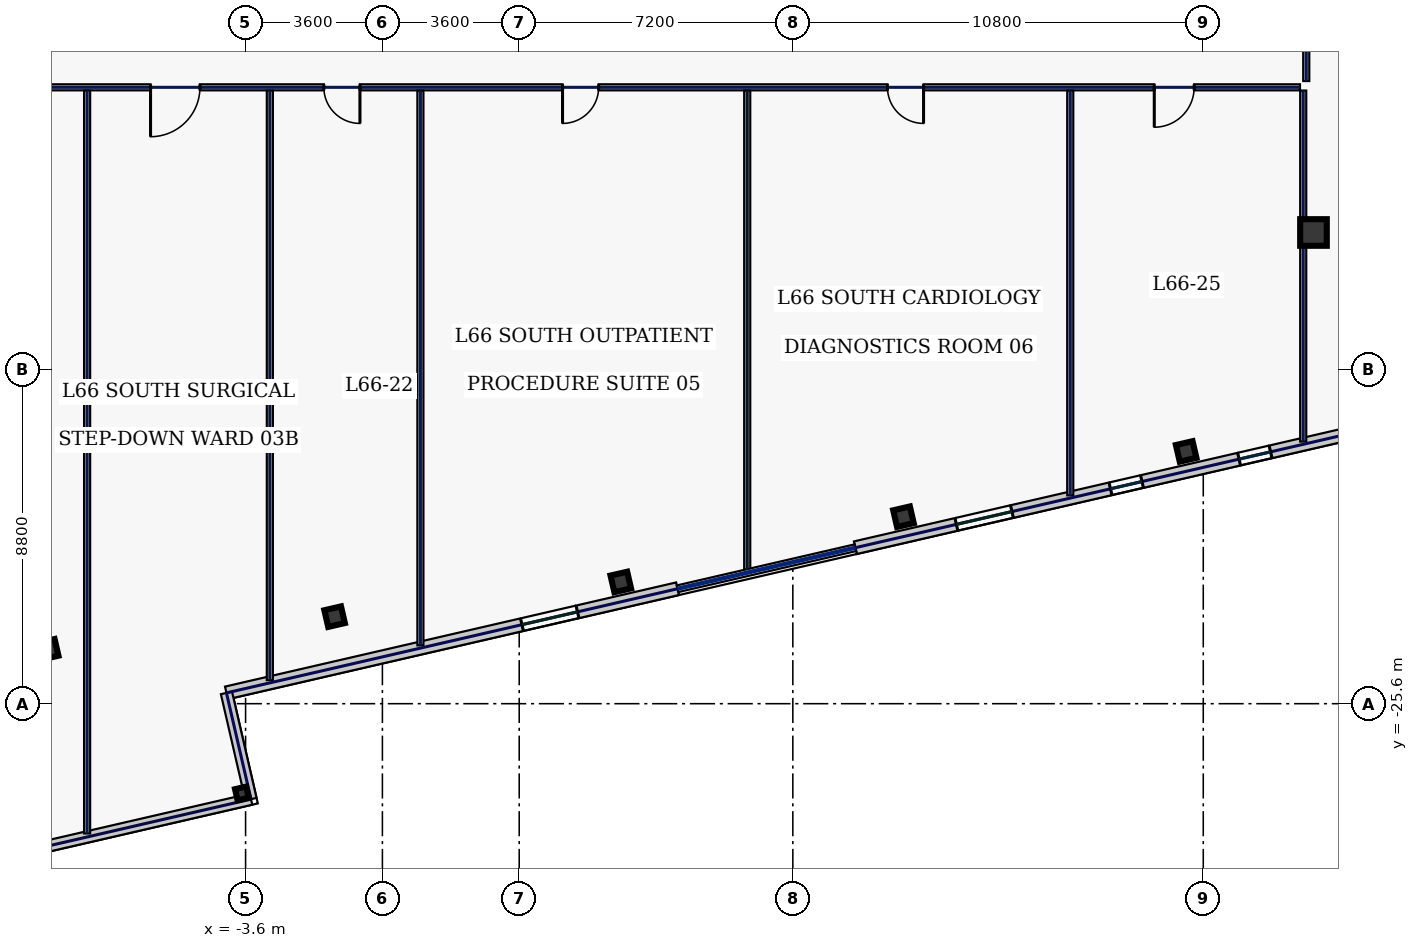
"""IFC4 building model, lengths in metres.
Left out: names, types, materials, properties, quantities, classifications, styles, units other than length and angle.
Written with IfcOpenShell. Run it as: python <this file> out.ifc"""

import sys

from ifc_helpers import new_model, si_unit, direction, frame, frame_2d, origin, origin_2d, place, context, subcontext, project, spatial, rectangle, hollow_rectangle, extrude, element, fill, save


model = new_model("IFC4")
c1 = context("Model", 3, precision=1e-05, world=origin(), true_north=direction((0.0, 1.0)))
c2 = subcontext(c1, "Body", "Model", "MODEL_VIEW")
j1 = project(units=[si_unit("LENGTHUNIT", "METRE"), si_unit("PLANEANGLEUNIT", "RADIAN")], contexts=[c1])
p1 = place(None, origin())
s1 = spatial("IfcSite", under=j1, at=p1, CompositionType="ELEMENT")
p2 = place(p1, origin())
s2 = spatial("IfcBuilding", under=s1, at=p2, CompositionType="ELEMENT")
p3 = place(p2, frame((0.0, 0.0, 285.0)))
s3 = spatial("IfcBuildingStorey", under=s2, at=p3, CompositionType="ELEMENT", Elevation=285.0)
p4 = place(p3, frame((24.5, -13.2, 0.0), z_axis=(0.0, 0.0, 1.0), x_axis=(1.0, 0.0, 0.0)))
e1 = element("IfcColumn", 1, at=p4, inside=s3, PredefinedType="COLUMN", context=c2, shape_type="SweptSolid", body=[
    extrude(hollow_rectangle(XDim=0.7, YDim=0.7, WallThickness=0.032, at=origin_2d()), origin(), (0.0, 0.0, 1.0), 3.74),
])
for number, where, z_axis, x_axis in (
    (2, (-8.794, -24.168, 0.0), (0.0, 0.0, 1.0), (0.974, 0.225, 0.0)),
    (3, (-1.258, -23.31, 0.0), (0.0, 0.0, 1.0), (0.974, 0.225, 0.0)),
    (4, (6.273, -22.397, 0.0), (0.0, 0.0, 1.0), (0.974, 0.225, 0.0)),
    (5, (13.711, -20.68, 0.0), (0.0, 0.0, 1.0), (0.974, 0.225, 0.0)),
    (6, (21.15, -18.962, 0.0), (0.0, 0.0, 1.0), (0.974, 0.225, 0.0)),
):
    element("IfcColumn", number, at=place(p3, frame(where, z_axis=z_axis, x_axis=x_axis)), inside=s3, PredefinedType="COLUMN", context=c2, shape_type="SweptSolid", body=[
        extrude(hollow_rectangle(XDim=0.45, YDim=0.45, WallThickness=0.022, at=origin_2d()), origin(), (0.0, 0.0, 1.0), 3.74),
    ])
p5 = place(p3, frame((-3.698, -27.963, 0.0), z_axis=(0.0, 0.0, 1.0), x_axis=(0.974370064785, 0.224951054344, 0.0)))
e7 = element("IfcColumn", 7, at=p5, inside=s3, PredefinedType="COLUMN", context=c2, shape_type="SweptSolid", body=[
    extrude(hollow_rectangle(XDim=0.3, YDim=0.3, WallThickness=0.016, at=origin_2d()), origin(), (0.0, 0.0, 1.0), 3.74),
])
p6 = place(p3, frame((-4.104, -25.316, 0.0), z_axis=(0.0, 0.0, 1.0), x_axis=(0.974372956312, 0.224938529398, 0.0)))
e8 = element("IfcWall", 8, at=p6, inside=s3, PredefinedType="STANDARD", context=c2, shape_type="SweptSolid", body=[
    extrude(rectangle(XDim=12.184, YDim=0.34, at=frame_2d((6.092, 0.0))), origin(), (0.0, 0.0, 1.0), 3.74),
])
p7 = place(p6, frame((7.981, 0.0, 0.9)))
e9 = element("IfcOpeningElement", 9, at=p7, cuts=e8, PredefinedType="OPENING", context=c2, shape_type="SweptSolid", body=[
    extrude(rectangle(XDim=1.5, YDim=2.0, at=frame_2d((0.75, 1.0))), frame((0.0, 0.18, 0.0), z_axis=(0.0, -1.0, 0.0), x_axis=(1.0, 0.0, 0.0)), (0.0, 0.0, 1.0), 0.36),
])
p8 = place(p3, frame((12.445, -21.495, 0.0), z_axis=(0.0, 0.0, 1.0), x_axis=(0.974369392164, 0.224953967767, 0.0)))
e10 = element("IfcWall", 10, at=p8, inside=s3, PredefinedType="STANDARD", context=c2, shape_type="SweptSolid", body=[
    extrude(rectangle(XDim=17.366, YDim=0.34, at=frame_2d((8.683, 0.0))), origin(), (0.0, 0.0, 1.0), 3.74),
])
p9 = place(p8, frame((2.729, 0.0, 0.9)))
e11 = element("IfcOpeningElement", 11, at=p9, cuts=e10, PredefinedType="OPENING", context=c2, shape_type="SweptSolid", body=[
    extrude(rectangle(XDim=1.5, YDim=2.0, at=frame_2d((0.75, 1.0))), frame((0.0, 0.18, 0.0), z_axis=(0.0, -1.0, 0.0), x_axis=(1.0, 0.0, 0.0)), (0.0, 0.0, 1.0), 0.36),
])
p10 = place(p8, frame((6.89, 0.0, 0.9)))
e12 = element("IfcOpeningElement", 12, at=p10, cuts=e10, PredefinedType="OPENING", context=c2, shape_type="SweptSolid", body=[
    extrude(rectangle(XDim=0.85, YDim=1.85, at=frame_2d((0.425, 0.925))), frame((0.0, 0.18, 0.0), z_axis=(0.0, -1.0, 0.0), x_axis=(1.0, 0.0, 0.0)), (0.0, 0.0, 1.0), 0.36),
])
p11 = place(p8, frame((10.363, 0.0, 0.9)))
e13 = element("IfcOpeningElement", 13, at=p11, cuts=e10, PredefinedType="OPENING", context=c2, shape_type="SweptSolid", body=[
    extrude(rectangle(XDim=0.85, YDim=1.85, at=frame_2d((0.425, 0.925))), frame((0.0, 0.18, 0.0), z_axis=(0.0, -1.0, 0.0), x_axis=(1.0, 0.0, 0.0)), (0.0, 0.0, 1.0), 0.36),
])
p12 = place(p8, frame((13.875, 0.0, 0.9)))
e14 = element("IfcOpeningElement", 14, at=p12, cuts=e10, PredefinedType="OPENING", context=c2, shape_type="SweptSolid", body=[
    extrude(rectangle(XDim=1.5, YDim=2.0, at=frame_2d((0.75, 1.0))), frame((0.0, 0.18, 0.0), z_axis=(0.0, -1.0, 0.0), x_axis=(1.0, 0.0, 0.0)), (0.0, 0.0, 1.0), 0.36),
])
p13 = place(p3, frame((32.686, -12.276, 0.0), z_axis=(0.0, 0.0, 1.0), x_axis=(-0.224953091034, 0.974369594576, 0.0)))
e15 = element("IfcWall", 15, at=p13, inside=s3, PredefinedType="STANDARD", context=c2, shape_type="SweptSolid", body=[
    extrude(rectangle(XDim=36.2, YDim=0.34, at=frame_2d((18.1, 0.0))), origin(), (0.0, 0.0, 1.0), 3.74),
])
p14 = place(p13, frame((3.725, 0.0, 0.58)))
e16 = element("IfcOpeningElement", 16, at=p14, cuts=e15, PredefinedType="OPENING", context=c2, shape_type="SweptSolid", body=[
    extrude(rectangle(XDim=1.6, YDim=2.3, at=frame_2d((0.8, 1.15))), frame((0.0, 0.18, 0.0), z_axis=(0.0, -1.0, 0.0), x_axis=(1.0, 0.0, 0.0)), (0.0, 0.0, 1.0), 0.36),
])
p15 = place(p13, frame((12.775, 0.0, 0.58)))
e17 = element("IfcOpeningElement", 17, at=p15, cuts=e15, PredefinedType="OPENING", context=c2, shape_type="SweptSolid", body=[
    extrude(rectangle(XDim=1.6, YDim=2.3, at=frame_2d((0.8, 1.15))), frame((0.0, 0.18, 0.0), z_axis=(0.0, -1.0, 0.0), x_axis=(1.0, 0.0, 0.0)), (0.0, 0.0, 1.0), 0.36),
])
p16 = place(p13, frame((21.825, 0.0, 0.58)))
e18 = element("IfcOpeningElement", 18, at=p16, cuts=e15, PredefinedType="OPENING", context=c2, shape_type="SweptSolid", body=[
    extrude(rectangle(XDim=1.6, YDim=2.3, at=frame_2d((0.8, 1.15))), frame((0.0, 0.18, 0.0), z_axis=(0.0, -1.0, 0.0), x_axis=(1.0, 0.0, 0.0)), (0.0, 0.0, 1.0), 0.36),
])
p17 = place(p13, frame((30.875, 0.0, 0.58)))
e19 = element("IfcOpeningElement", 19, at=p17, cuts=e15, PredefinedType="OPENING", context=c2, shape_type="SweptSolid", body=[
    extrude(rectangle(XDim=1.6, YDim=2.3, at=frame_2d((0.8, 1.15))), frame((0.0, 0.18, 0.0), z_axis=(0.0, -1.0, 0.0), x_axis=(1.0, 0.0, 0.0)), (0.0, 0.0, 1.0), 0.36),
])
p18 = place(p3, frame((-4.104, -25.316, 0.0), z_axis=(0.0, 0.0, 1.0), x_axis=(0.225002397841, -0.97435820978, 0.0)))
e20 = element("IfcWall", 20, at=p18, inside=s3, PredefinedType="STANDARD", context=c2, shape_type="SweptSolid", body=[
    extrude(rectangle(XDim=2.87, YDim=0.3, at=frame_2d((1.435, 0.0))), origin(), (0.0, 0.0, 1.0), 3.285),
])
p19 = place(p3, frame((-11.351, -29.935, 0.0), z_axis=(0.0, 0.0, 1.0), x_axis=(0.974366807022, 0.224965164799, 0.0)))
e21 = element("IfcWall", 21, at=p19, inside=s3, PredefinedType="STANDARD", context=c2, shape_type="SweptSolid", body=[
    extrude(rectangle(XDim=8.1, YDim=0.3, at=frame_2d((4.05, 0.0))), origin(), (0.0, 0.0, 1.0), 3.385),
])
p20 = place(p3, frame((24.31, 9.415, 0.0), z_axis=(0.0, 0.0, 1.0), x_axis=(0.0, -1.0, 0.0)))
e22 = element("IfcWall", 22, at=p20, inside=s3, PredefinedType="PARTITIONING", context=c2, shape_type="SweptSolid", body=[
    extrude(rectangle(XDim=18.63, YDim=0.16, at=frame_2d((9.315, 0.0))), origin(), (0.0, 0.0, 1.0), 3.74),
])
p21 = place(p20, frame((14.106, 0.0, 0.0)))
e23 = element("IfcOpeningElement", 23, at=p21, cuts=e22, PredefinedType="OPENING", context=c2, shape_type="SweptSolid", body=[
    extrude(rectangle(XDim=0.95, YDim=2.2, at=frame_2d((0.475, 1.1))), frame((0.0, 0.09, 0.0), z_axis=(0.0, -1.0, 0.0), x_axis=(1.0, 0.0, 0.0)), (0.0, 0.0, 1.0), 0.18),
])
p22 = place(p20, frame((5.094, 0.0, 0.0)))
e24 = element("IfcOpeningElement", 24, at=p22, cuts=e22, PredefinedType="OPENING", context=c2, shape_type="SweptSolid", body=[
    extrude(rectangle(XDim=0.95, YDim=2.2, at=frame_2d((0.475, 1.1))), frame((0.0, 0.09, 0.0), z_axis=(0.0, -1.0, 0.0), x_axis=(1.0, 0.0, 0.0)), (0.0, 0.0, 1.0), 0.18),
])
p23 = place(p3, frame((24.145, -9.38, 0.0), z_axis=(0.0, 0.0, 1.0), x_axis=(-1.0, 0.0, 0.0)))
e25 = element("IfcWall", 25, at=p23, inside=s3, PredefinedType="PARTITIONING", context=c2, shape_type="SweptSolid", body=[
    extrude(rectangle(XDim=36.68, YDim=0.16, at=frame_2d((18.34, 0.0))), origin(), (0.0, 0.0, 1.0), 3.74),
])
p24 = place(p23, frame((33.581, 0.0, 0.0)))
e26 = element("IfcOpeningElement", 26, at=p24, cuts=e25, PredefinedType="OPENING", context=c2, shape_type="SweptSolid", body=[
    extrude(rectangle(XDim=1.3, YDim=2.2, at=frame_2d((0.65, 1.1))), frame((0.0, 0.09, 0.0), z_axis=(0.0, -1.0, 0.0), x_axis=(1.0, 0.0, 0.0)), (0.0, 0.0, 1.0), 0.18),
])
p25 = place(p23, frame((28.946, 0.0, 0.0)))
e27 = element("IfcOpeningElement", 27, at=p25, cuts=e25, PredefinedType="OPENING", context=c2, shape_type="SweptSolid", body=[
    extrude(rectangle(XDim=1.3, YDim=2.2, at=frame_2d((0.65, 1.1))), frame((0.0, 0.09, 0.0), z_axis=(0.0, -1.0, 0.0), x_axis=(1.0, 0.0, 0.0)), (0.0, 0.0, 1.0), 0.18),
])
p26 = place(p23, frame((24.736, 0.0, 0.0)))
e28 = element("IfcOpeningElement", 28, at=p26, cuts=e25, PredefinedType="OPENING", context=c2, shape_type="SweptSolid", body=[
    extrude(rectangle(XDim=0.95, YDim=2.2, at=frame_2d((0.475, 1.1))), frame((0.0, 0.09, 0.0), z_axis=(0.0, -1.0, 0.0), x_axis=(1.0, 0.0, 0.0)), (0.0, 0.0, 1.0), 0.18),
])
p27 = place(p23, frame((18.455, 0.0, 0.0)))
e29 = element("IfcOpeningElement", 29, at=p27, cuts=e25, PredefinedType="OPENING", context=c2, shape_type="SweptSolid", body=[
    extrude(rectangle(XDim=0.95, YDim=2.2, at=frame_2d((0.475, 1.1))), frame((0.0, 0.09, 0.0), z_axis=(0.0, -1.0, 0.0), x_axis=(1.0, 0.0, 0.0)), (0.0, 0.0, 1.0), 0.18),
])
p28 = place(p23, frame((9.905, 0.0, 0.0)))
e30 = element("IfcOpeningElement", 30, at=p28, cuts=e25, PredefinedType="OPENING", context=c2, shape_type="SweptSolid", body=[
    extrude(rectangle(XDim=0.95, YDim=2.2, at=frame_2d((0.475, 1.1))), frame((0.0, 0.09, 0.0), z_axis=(0.0, -1.0, 0.0), x_axis=(1.0, 0.0, 0.0)), (0.0, 0.0, 1.0), 0.18),
])
p29 = place(p23, frame((2.784, 0.0, 0.0)))
e31 = element("IfcOpeningElement", 31, at=p29, cuts=e25, PredefinedType="OPENING", context=c2, shape_type="SweptSolid", body=[
    extrude(rectangle(XDim=1.05, YDim=2.2, at=frame_2d((0.525, 1.1))), frame((0.0, 0.09, 0.0), z_axis=(0.0, -1.0, 0.0), x_axis=(1.0, 0.0, 0.0)), (0.0, 0.0, 1.0), 0.18),
])
p30 = place(p3, frame((24.23, -18.703, 0.0), z_axis=(0.0, 0.0, 1.0), x_axis=(0.0, 1.0, 0.0)))
e32 = element("IfcWall", 32, at=p30, inside=s3, PredefinedType="PARTITIONING", context=c2, shape_type="SweptSolid", body=[
    extrude(rectangle(XDim=9.238, YDim=0.16, at=frame_2d((4.619, 0.0))), origin(), (0.0, 0.0, 1.0), 3.74),
])
p31 = place(p3, frame((-2.962, -24.98, 0.0), z_axis=(0.0, 0.0, 1.0), x_axis=(0.0, 1.0, 0.0)))
e33 = element("IfcWall", 33, at=p31, inside=s3, PredefinedType="PARTITIONING", context=c2, shape_type="SweptSolid", body=[
    extrude(rectangle(XDim=15.515, YDim=0.16, at=frame_2d((7.758, 0.0))), origin(), (0.0, 0.0, 1.0), 3.335),
])
p32 = place(p3, frame((1.0, -24.066, 0.0), z_axis=(0.0, 0.0, 1.0), x_axis=(0.0, 1.0, 0.0)))
e34 = element("IfcWall", 34, at=p32, inside=s3, PredefinedType="PARTITIONING", context=c2, shape_type="SweptSolid", body=[
    extrude(rectangle(XDim=14.601, YDim=0.16, at=frame_2d((7.3, 0.0))), origin(), (0.0, 0.0, 1.0), 3.74),
])
p33 = place(p3, frame((9.6, -22.08, 0.0), z_axis=(0.0, 0.0, 1.0), x_axis=(0.0, 1.0, 0.0)))
e35 = element("IfcWall", 35, at=p33, inside=s3, PredefinedType="PARTITIONING", context=c2, shape_type="SweptSolid", body=[
    extrude(rectangle(XDim=12.615, YDim=0.16, at=frame_2d((6.308, 0.0))), origin(), (0.0, 0.0, 1.0), 3.165),
])
p34 = place(p3, frame((18.1, -20.118, 0.0), z_axis=(0.0, 0.0, 1.0), x_axis=(0.0, 1.0, 0.0)))
e36 = element("IfcWall", 36, at=p34, inside=s3, PredefinedType="PARTITIONING", context=c2, shape_type="SweptSolid", body=[
    extrude(rectangle(XDim=10.653, YDim=0.16, at=frame_2d((5.326, 0.0))), origin(), (0.0, 0.0, 1.0), 3.74),
])
p35 = place(p3, frame((-7.77, -29.015, 0.0), z_axis=(0.0, 0.0, 1.0), x_axis=(0.0, 1.0, 0.0)))
e37 = element("IfcWall", 37, at=p35, inside=s3, PredefinedType="PARTITIONING", context=c2, shape_type="SweptSolid", body=[
    extrude(rectangle(XDim=19.55, YDim=0.16, at=frame_2d((9.775, 0.0))), origin(), (0.0, 0.0, 1.0), 3.74),
])
p36 = place(p7, origin())
e38 = element("IfcWindow", 38, at=p36, inside=s3, PartitioningType="SINGLE_PANEL", PredefinedType="WINDOW", context=c2, shape_type="SweptSolid", body=[
    extrude(rectangle(XDim=1.5, YDim=2.0, at=frame_2d((0.75, 1.0))), frame((0.0, 0.03, 0.0), z_axis=(0.0, -1.0, 0.0), x_axis=(1.0, 0.0, 0.0)), (0.0, 0.0, 1.0), 0.06),
])
fill(e9, e38)
p37 = place(p9, origin())
e39 = element("IfcWindow", 39, at=p37, inside=s3, PartitioningType="SINGLE_PANEL", PredefinedType="WINDOW", context=c2, shape_type="SweptSolid", body=[
    extrude(rectangle(XDim=1.5, YDim=2.0, at=frame_2d((0.75, 1.0))), frame((0.0, 0.03, 0.0), z_axis=(0.0, -1.0, 0.0), x_axis=(1.0, 0.0, 0.0)), (0.0, 0.0, 1.0), 0.06),
])
fill(e11, e39)
p38 = place(p10, origin())
e40 = element("IfcWindow", 40, at=p38, inside=s3, PartitioningType="SINGLE_PANEL", PredefinedType="WINDOW", context=c2, shape_type="SweptSolid", body=[
    extrude(rectangle(XDim=0.85, YDim=1.85, at=frame_2d((0.425, 0.925))), frame((0.0, 0.03, 0.0), z_axis=(0.0, -1.0, 0.0), x_axis=(1.0, 0.0, 0.0)), (0.0, 0.0, 1.0), 0.06),
])
fill(e12, e40)
p39 = place(p11, origin())
e41 = element("IfcWindow", 41, at=p39, inside=s3, PartitioningType="SINGLE_PANEL", PredefinedType="WINDOW", context=c2, shape_type="SweptSolid", body=[
    extrude(rectangle(XDim=0.85, YDim=1.85, at=frame_2d((0.425, 0.925))), frame((0.0, 0.03, 0.0), z_axis=(0.0, -1.0, 0.0), x_axis=(1.0, 0.0, 0.0)), (0.0, 0.0, 1.0), 0.06),
])
fill(e13, e41)
p40 = place(p25, origin())
e42 = element("IfcDoor", 42, at=p40, inside=s3, OperationType="SINGLE_SWING_RIGHT", PredefinedType="DOOR", context=c2, shape_type="SweptSolid", body=[
    extrude(rectangle(XDim=1.3, YDim=2.2, at=frame_2d((0.65, 1.1))), frame((0.0, 0.025, 0.0), z_axis=(0.0, -1.0, 0.0), x_axis=(1.0, 0.0, 0.0)), (0.0, 0.0, 1.0), 0.05),
])
fill(e27, e42)
p41 = place(p26, origin())
e43 = element("IfcDoor", 43, at=p41, inside=s3, OperationType="SINGLE_SWING_LEFT", PredefinedType="DOOR", context=c2, shape_type="SweptSolid", body=[
    extrude(rectangle(XDim=0.95, YDim=2.2, at=frame_2d((0.475, 1.1))), frame((0.0, 0.025, 0.0), z_axis=(0.0, -1.0, 0.0), x_axis=(1.0, 0.0, 0.0)), (0.0, 0.0, 1.0), 0.05),
])
fill(e28, e43)
p42 = place(p27, origin())
e44 = element("IfcDoor", 44, at=p42, inside=s3, OperationType="SINGLE_SWING_RIGHT", PredefinedType="DOOR", context=c2, shape_type="SweptSolid", body=[
    extrude(rectangle(XDim=0.95, YDim=2.2, at=frame_2d((0.475, 1.1))), frame((0.0, 0.025, 0.0), z_axis=(0.0, -1.0, 0.0), x_axis=(1.0, 0.0, 0.0)), (0.0, 0.0, 1.0), 0.05),
])
fill(e29, e44)
p43 = place(p28, origin())
e45 = element("IfcDoor", 45, at=p43, inside=s3, OperationType="SINGLE_SWING_LEFT", PredefinedType="DOOR", context=c2, shape_type="SweptSolid", body=[
    extrude(rectangle(XDim=0.95, YDim=2.2, at=frame_2d((0.475, 1.1))), frame((0.0, 0.025, 0.0), z_axis=(0.0, -1.0, 0.0), x_axis=(1.0, 0.0, 0.0)), (0.0, 0.0, 1.0), 0.05),
])
fill(e30, e45)
p44 = place(p29, origin())
e46 = element("IfcDoor", 46, at=p44, inside=s3, OperationType="SINGLE_SWING_RIGHT", PredefinedType="DOOR", context=c2, shape_type="SweptSolid", body=[
    extrude(rectangle(XDim=1.05, YDim=2.2, at=frame_2d((0.525, 1.1))), frame((0.0, 0.025, 0.0), z_axis=(0.0, -1.0, 0.0), x_axis=(1.0, 0.0, 0.0)), (0.0, 0.0, 1.0), 0.05),
])
fill(e31, e46)
save(model, sys.argv[1])
